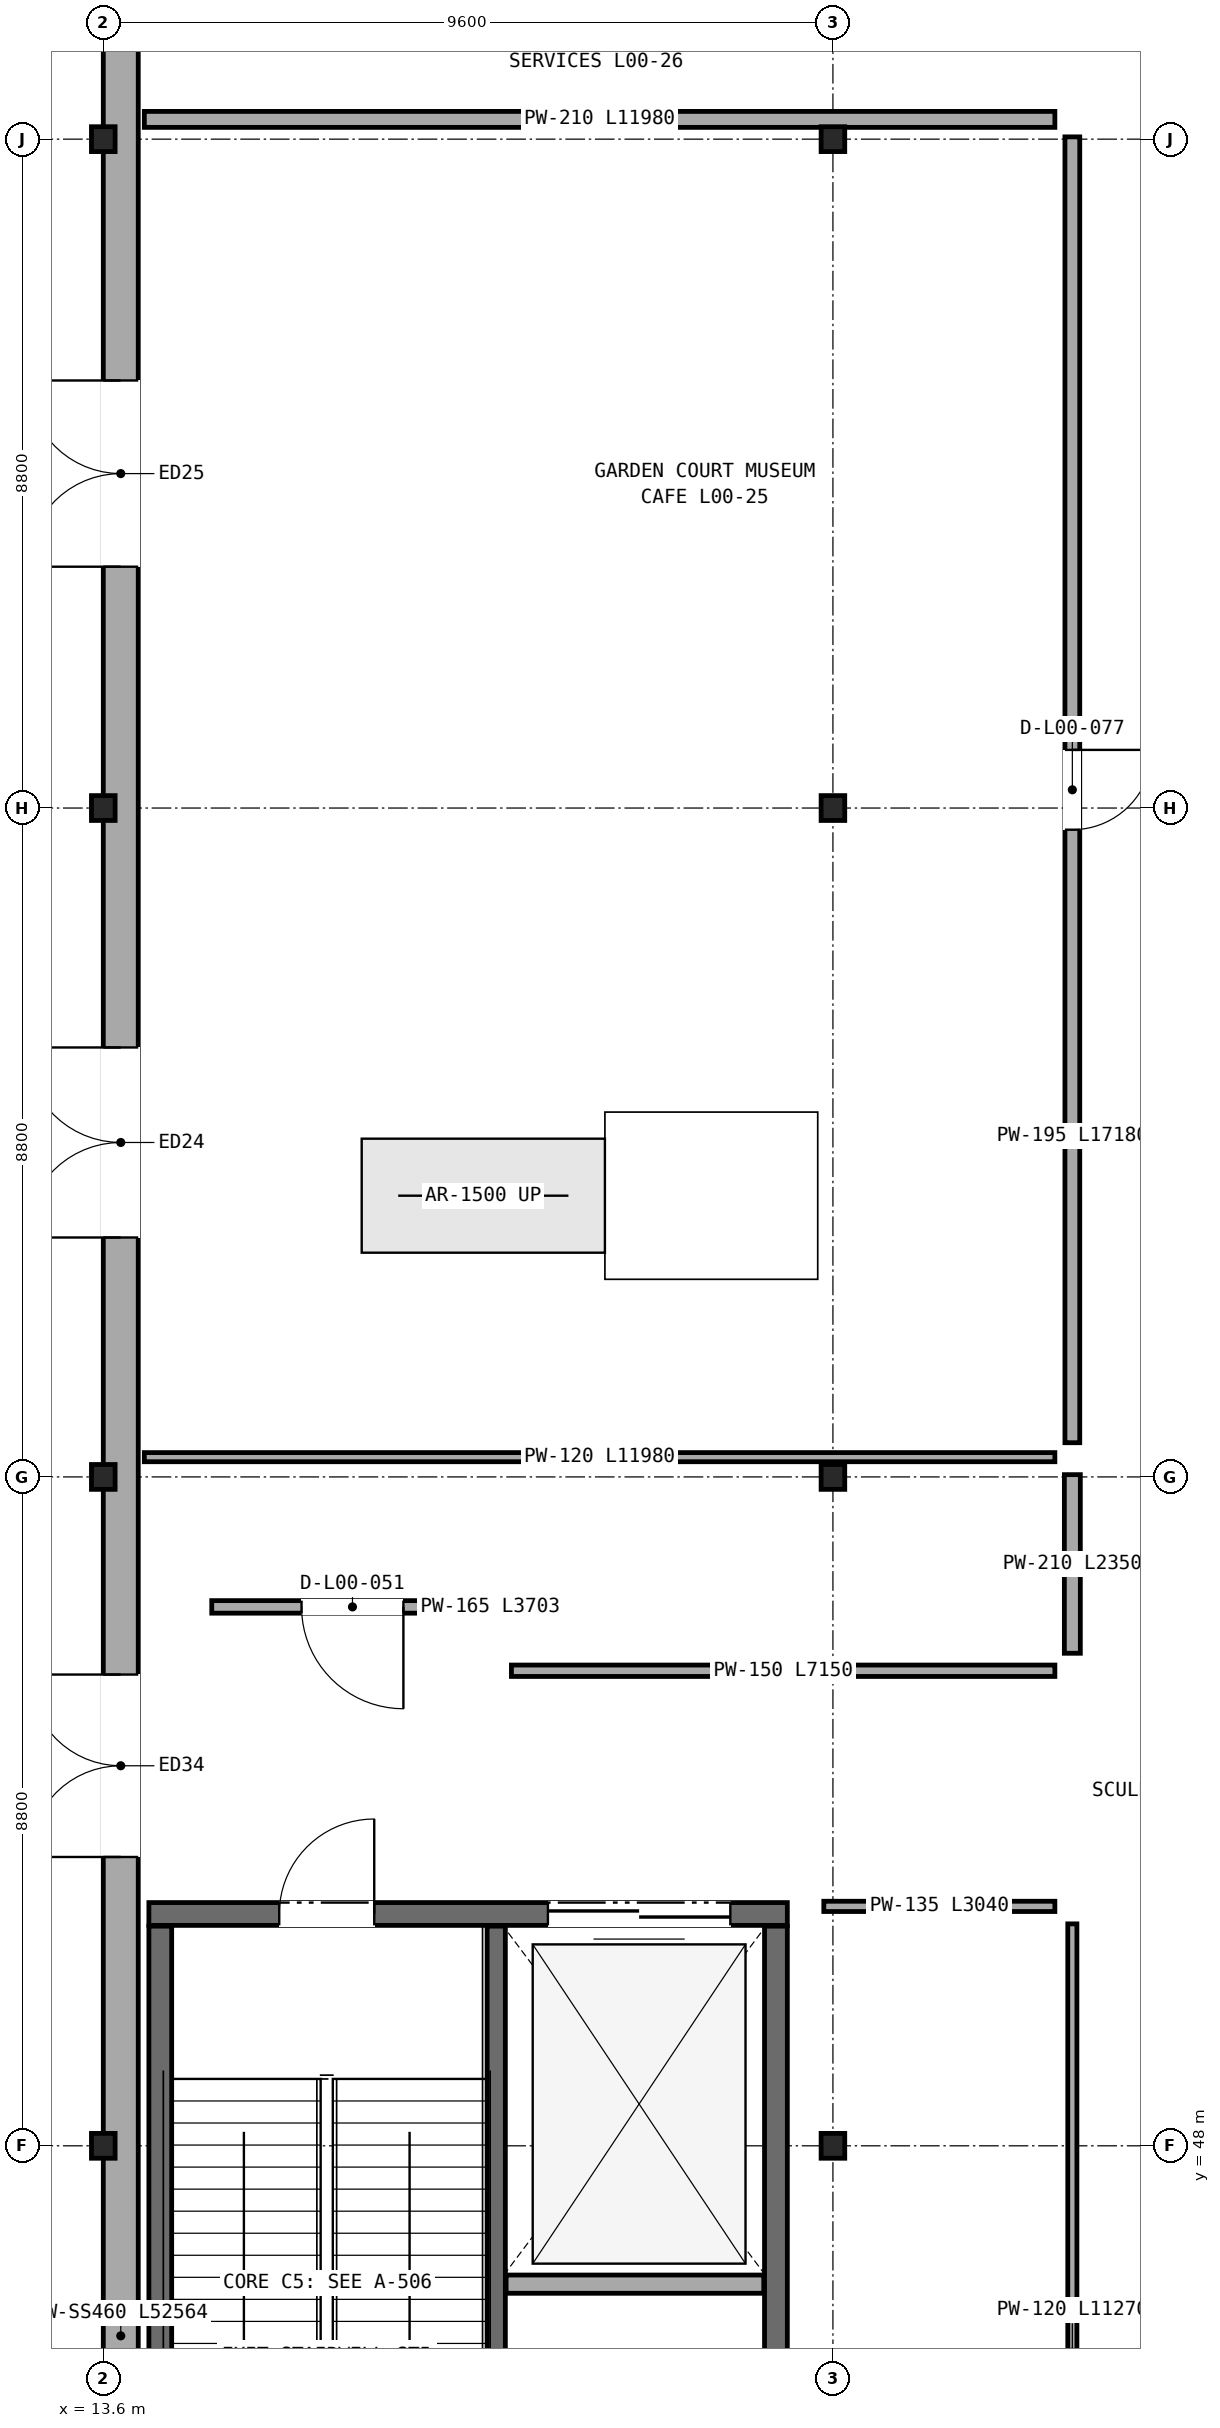
"""IFC4 building model, lengths in metres.
Left out: names, types, materials, properties, quantities, classifications, styles, units other than length and angle.
Written with IfcOpenShell. Run it as: python <this file> out.ifc"""

import sys

from ifc_helpers import new_model, si_unit, direction, frame, frame_2d, origin, origin_2d, place, context, subcontext, project, spatial, rectangle, i_section, extrude, element, fill, save


model = new_model("IFC4")
c1 = context("Model", 3, precision=1e-05, world=origin(), true_north=direction((0.0, 1.0)))
c2 = subcontext(c1, "Body", "Model", "MODEL_VIEW")
j1 = project(units=[si_unit("LENGTHUNIT", "METRE"), si_unit("PLANEANGLEUNIT", "RADIAN")], contexts=[c1])
p1 = place(None, origin())
s1 = spatial("IfcSite", under=j1, at=p1, CompositionType="ELEMENT")
p2 = place(p1, origin())
s2 = spatial("IfcBuilding", under=s1, at=p2, CompositionType="ELEMENT")
p3 = place(p2, origin())
s3 = spatial("IfcBuildingStorey", under=s2, at=p3, CompositionType="ELEMENT", Elevation=0.0)
for number, where, z_axis, x_axis in (
    (1, (13.6, 48.0, 0.0), (0.0, 0.0, 1.0), (1.0, 0.0, 0.0)),
    (2, (13.6, 56.8, 0.0), (0.0, 0.0, 1.0), (1.0, 0.0, 0.0)),
    (3, (13.6, 65.6, 0.0), (0.0, 0.0, 1.0), (1.0, 0.0, 0.0)),
    (4, (13.6, 74.4, 0.0), (0.0, 0.0, 1.0), (1.0, 0.0, 0.0)),
    (5, (23.2, 48.0, 0.0), (0.0, 0.0, 1.0), (1.0, 0.0, 0.0)),
    (6, (23.2, 56.8, 0.0), (0.0, 0.0, 1.0), (1.0, 0.0, 0.0)),
    (7, (23.2, 65.6, 0.0), (0.0, 0.0, 1.0), (1.0, 0.0, 0.0)),
    (8, (23.2, 74.4, 0.0), (0.0, 0.0, 1.0), (1.0, 0.0, 0.0)),
):
    element("IfcColumn", number, at=place(p3, frame(where, z_axis=z_axis, x_axis=x_axis)), inside=s3, PredefinedType="COLUMN", context=c2, shape_type="SweptSolid", body=[
        extrude(i_section(OverallWidth=0.311, OverallDepth=0.327, WebThickness=0.016, FlangeThickness=0.025, FilletRadius=0.017, at=origin_2d()), origin(), (0.0, 0.0, 1.0), 5.6),
    ])
p4 = place(p3, frame((13.83, 91.764, 0.0), z_axis=(0.0, 0.0, 1.0), x_axis=(0.0, -1.0, 0.0)))
e9 = element("IfcWall", 9, at=p4, inside=s3, PredefinedType="SOLIDWALL", context=c2, shape_type="SweptSolid", body=[
    extrude(rectangle(XDim=52.564, YDim=0.46, at=frame_2d((26.282, 0.0))), origin(), (0.0, 0.0, 1.0), 4.653),
])
p5 = place(p4, frame((29.314, 0.0, 0.0)))
e10 = element("IfcOpeningElement", 10, at=p5, cuts=e9, PredefinedType="OPENING", context=c2, shape_type="SweptSolid", body=[
    extrude(rectangle(XDim=2.5, YDim=2.55, at=frame_2d((1.25, 1.275))), frame((0.0, 0.24, 0.0), z_axis=(0.0, -1.0, 0.0), x_axis=(1.0, 0.0, 0.0)), (0.0, 0.0, 1.0), 0.48),
])
p6 = place(p4, frame((20.539, 0.0, 0.0)))
e11 = element("IfcOpeningElement", 11, at=p6, cuts=e9, PredefinedType="OPENING", context=c2, shape_type="SweptSolid", body=[
    extrude(rectangle(XDim=2.45, YDim=2.5, at=frame_2d((1.225, 1.25))), frame((0.0, 0.24, 0.0), z_axis=(0.0, -1.0, 0.0), x_axis=(1.0, 0.0, 0.0)), (0.0, 0.0, 1.0), 0.48),
])
p7 = place(p4, frame((11.764, 0.0, 0.0)))
e12 = element("IfcOpeningElement", 12, at=p7, cuts=e9, PredefinedType="OPENING", context=c2, shape_type="SweptSolid", body=[
    extrude(rectangle(XDim=2.4, YDim=2.45, at=frame_2d((1.2, 1.225))), frame((0.0, 0.24, 0.0), z_axis=(0.0, -1.0, 0.0), x_axis=(1.0, 0.0, 0.0)), (0.0, 0.0, 1.0), 0.48),
])
p8 = place(p4, frame((3.014, 0.0, 0.0)))
e13 = element("IfcOpeningElement", 13, at=p8, cuts=e9, PredefinedType="OPENING", context=c2, shape_type="SweptSolid", body=[
    extrude(rectangle(XDim=2.3, YDim=2.4, at=frame_2d((1.15, 1.2))), frame((0.0, 0.24, 0.0), z_axis=(0.0, -1.0, 0.0), x_axis=(1.0, 0.0, 0.0)), (0.0, 0.0, 1.0), 0.48),
])
p9 = place(p4, frame((37.564, 0.0, 0.0)))
e14 = element("IfcOpeningElement", 14, at=p9, cuts=e9, PredefinedType="OPENING", context=c2, shape_type="SweptSolid", body=[
    extrude(rectangle(XDim=2.4, YDim=2.45, at=frame_2d((1.2, 1.225))), frame((0.0, 0.24, 0.0), z_axis=(0.0, -1.0, 0.0), x_axis=(1.0, 0.0, 0.0)), (0.0, 0.0, 1.0), 0.48),
])
p10 = place(p4, frame((6.4, 0.0, 0.9)))
e15 = element("IfcOpeningElement", 15, at=p10, cuts=e9, PredefinedType="OPENING", context=c2, shape_type="SweptSolid", body=[
    extrude(rectangle(XDim=1.4, YDim=1.85, at=frame_2d((0.7, 0.925))), frame((0.0, 0.24, 0.0), z_axis=(0.0, -1.0, 0.0), x_axis=(1.0, 0.0, 0.0)), (0.0, 0.0, 1.0), 0.48),
])
p11 = place(p3, frame((22.6, 51.05, 0.0), z_axis=(0.0, 0.0, 1.0), x_axis=(-1.0, 0.0, 0.0)))
e16 = element("IfcWall", 16, at=p11, inside=s3, PredefinedType="SHEAR", context=c2, shape_type="SweptSolid", body=[
    extrude(rectangle(XDim=8.4, YDim=0.3, at=frame_2d((4.2, 0.0))), origin(), (0.0, 0.0, 1.0), 5.345),
])
p12 = place(p11, frame((5.435, 0.0, 0.0)))
e17 = element("IfcOpeningElement", 17, at=p12, cuts=e16, PredefinedType="OPENING", context=c2, shape_type="SweptSolid", body=[
    extrude(rectangle(XDim=1.25, YDim=2.2, at=frame_2d((0.625, 1.1))), frame((0.0, 0.16, 0.0), z_axis=(0.0, -1.0, 0.0), x_axis=(1.0, 0.0, 0.0)), (0.0, 0.0, 1.0), 0.32),
])
p13 = place(p11, frame((0.75, 0.0, 0.0)))
e18 = element("IfcOpeningElement", 18, at=p13, cuts=e16, PredefinedType="OPENING", context=c2, shape_type="SweptSolid", body=[
    extrude(rectangle(XDim=2.4, YDim=2.55, at=frame_2d((1.2, 1.275))), frame((0.0, 0.16, 0.0), z_axis=(0.0, -1.0, 0.0), x_axis=(1.0, 0.0, 0.0)), (0.0, 0.0, 1.0), 0.32),
])
for number, where, z_axis, x_axis in (
    (19, (22.45, 41.51, 0.0), (0.0, 0.0, 1.0), (0.0, 1.0, 0.0)),
    (20, (14.35, 50.89, 0.0), (0.0, 0.0, 1.0), (0.0, -1.0, 0.0)),
):
    element("IfcWall", number, at=place(p3, frame(where, z_axis=z_axis, x_axis=x_axis)), inside=s3, PredefinedType="SHEAR", context=c2, shape_type="SweptSolid", body=[
        extrude(rectangle(XDim=9.38, YDim=0.3, at=frame_2d((4.69, 0.0))), origin(), (0.0, 0.0, 1.0), 5.345),
    ])
p14 = place(p3, frame((18.77, 41.51, 0.0), z_axis=(0.0, 0.0, 1.0), x_axis=(0.0, 1.0, 0.0)))
e21 = element("IfcWall", 21, at=p14, inside=s3, PredefinedType="SOLIDWALL", context=c2, shape_type="SweptSolid", body=[
    extrude(rectangle(XDim=9.38, YDim=0.24, at=frame_2d((4.69, 0.0))), origin(), (0.0, 0.0, 1.0), 5.345),
])
p15 = place(p3, frame((18.9, 46.18, 0.0), z_axis=(0.0, 0.0, 1.0), x_axis=(1.0, 0.0, 0.0)))
e22 = element("IfcWall", 22, at=p15, inside=s3, PredefinedType="SOLIDWALL", context=c2, shape_type="SweptSolid", body=[
    extrude(rectangle(XDim=3.39, YDim=0.24, at=frame_2d((1.695, 0.0))), origin(), (0.0, 0.0, 1.0), 5.345),
])
p16 = place(p3, frame((18.73, 55.09, 0.0), z_axis=(0.0, 0.0, 1.0), x_axis=(-1.0, 0.0, 0.0)))
e23 = element("IfcWall", 23, at=p16, inside=s3, PredefinedType="PARTITIONING", context=c2, shape_type="SweptSolid", body=[
    extrude(rectangle(XDim=3.703, YDim=0.165, at=frame_2d((1.852, 0.0))), origin(), (0.0, 0.0, 1.0), 5.23),
])
p17 = place(p16, frame((1.181, 0.0, 0.0)))
e24 = element("IfcOpeningElement", 24, at=p17, cuts=e23, PredefinedType="OPENING", context=c2, shape_type="SweptSolid", body=[
    extrude(rectangle(XDim=1.34, YDim=2.16, at=frame_2d((0.67, 1.08))), frame((0.0, 0.093, 0.0), z_axis=(0.0, -1.0, 0.0), x_axis=(1.0, 0.0, 0.0)), (0.0, 0.0, 1.0), 0.185),
])
p18 = place(p3, frame((26.12, 54.25, 0.0), z_axis=(0.0, 0.0, 1.0), x_axis=(-1.0, 0.0, 0.0)))
e25 = element("IfcWall", 25, at=p18, inside=s3, PredefinedType="PARTITIONING", context=c2, shape_type="SweptSolid", body=[
    extrude(rectangle(XDim=7.15, YDim=0.15, at=frame_2d((3.575, 0.0))), origin(), (0.0, 0.0, 1.0), 4.787),
])
p19 = place(p3, frame((23.08, 51.15, 0.0), z_axis=(0.0, 0.0, 1.0), x_axis=(1.0, 0.0, 0.0)))
e26 = element("IfcWall", 26, at=p19, inside=s3, PredefinedType="PARTITIONING", context=c2, shape_type="SweptSolid", body=[
    extrude(rectangle(XDim=3.04, YDim=0.135, at=frame_2d((1.52, 0.0))), origin(), (0.0, 0.0, 1.0), 4.787),
])
p20 = place(p3, frame((26.35, 50.92, 0.0), z_axis=(0.0, 0.0, 1.0), x_axis=(0.0, -1.0, 0.0)))
e27 = element("IfcWall", 27, at=p20, inside=s3, PredefinedType="PARTITIONING", context=c2, shape_type="SweptSolid", body=[
    extrude(rectangle(XDim=11.27, YDim=0.12, at=frame_2d((5.635, 0.0))), origin(), (0.0, 0.0, 1.0), 4.708),
])
p21 = place(p3, frame((26.35, 56.83, 0.0), z_axis=(0.0, 0.0, 1.0), x_axis=(0.0, -1.0, 0.0)))
e28 = element("IfcWall", 28, at=p21, inside=s3, PredefinedType="PARTITIONING", context=c2, shape_type="SweptSolid", body=[
    extrude(rectangle(XDim=2.35, YDim=0.21, at=frame_2d((1.175, 0.0))), origin(), (0.0, 0.0, 1.0), 4.708),
])
p22 = place(p3, frame((26.35, 74.43, 0.0), z_axis=(0.0, 0.0, 1.0), x_axis=(0.0, -1.0, 0.0)))
e29 = element("IfcWall", 29, at=p22, inside=s3, PredefinedType="PARTITIONING", context=c2, shape_type="SweptSolid", body=[
    extrude(rectangle(XDim=17.18, YDim=0.195, at=frame_2d((8.59, 0.0))), origin(), (0.0, 0.0, 1.0), 4.708),
])
p23 = place(p22, frame((8.065, 0.0, 0.0)))
e30 = element("IfcOpeningElement", 30, at=p23, cuts=e29, PredefinedType="OPENING", context=c2, shape_type="SweptSolid", body=[
    extrude(rectangle(XDim=1.05, YDim=2.15, at=frame_2d((0.525, 1.075))), frame((0.0, 0.107, 0.0), z_axis=(0.0, -1.0, 0.0), x_axis=(1.0, 0.0, 0.0)), (0.0, 0.0, 1.0), 0.215),
])
p24 = place(p3, frame((14.14, 57.06, 0.0), z_axis=(0.0, 0.0, 1.0), x_axis=(1.0, 0.0, 0.0)))
e31 = element("IfcWall", 31, at=p24, inside=s3, PredefinedType="PARTITIONING", context=c2, shape_type="SweptSolid", body=[
    extrude(rectangle(XDim=11.98, YDim=0.12, at=frame_2d((5.99, 0.0))), origin(), (0.0, 0.0, 1.0), 4.708),
])
p25 = place(p3, frame((14.14, 74.66, 0.0), z_axis=(0.0, 0.0, 1.0), x_axis=(1.0, 0.0, 0.0)))
e32 = element("IfcWall", 32, at=p25, inside=s3, PredefinedType="PARTITIONING", context=c2, shape_type="SweptSolid", body=[
    extrude(rectangle(XDim=11.98, YDim=0.21, at=frame_2d((5.99, 0.0))), origin(), (0.0, 0.0, 1.0), 4.708),
])
p26 = place(p5, frame((2.5, 0.0, 0.0), z_axis=(0.0, 0.0, 1.0), x_axis=(-1.0, 0.0, 0.0)))
e33 = element("IfcDoor", 33, at=p26, inside=s3, OperationType="DOUBLE_DOOR_SINGLE_SWING", PredefinedType="DOOR", context=c2, shape_type="SweptSolid", body=[
    extrude(rectangle(XDim=2.5, YDim=2.55, at=frame_2d((1.25, 1.275))), frame((0.0, 0.025, 0.0), z_axis=(0.0, -1.0, 0.0), x_axis=(1.0, 0.0, 0.0)), (0.0, 0.0, 1.0), 0.05),
])
fill(e10, e33)
p27 = place(p6, frame((2.45, 0.0, 0.0), z_axis=(0.0, 0.0, 1.0), x_axis=(-1.0, 0.0, 0.0)))
e34 = element("IfcDoor", 34, at=p27, inside=s3, OperationType="DOUBLE_DOOR_SINGLE_SWING", PredefinedType="DOOR", context=c2, shape_type="SweptSolid", body=[
    extrude(rectangle(XDim=2.45, YDim=2.5, at=frame_2d((1.225, 1.25))), frame((0.0, 0.025, 0.0), z_axis=(0.0, -1.0, 0.0), x_axis=(1.0, 0.0, 0.0)), (0.0, 0.0, 1.0), 0.05),
])
fill(e11, e34)
p28 = place(p9, frame((2.4, 0.0, 0.0), z_axis=(0.0, 0.0, 1.0), x_axis=(-1.0, 0.0, 0.0)))
e35 = element("IfcDoor", 35, at=p28, inside=s3, OperationType="DOUBLE_DOOR_SINGLE_SWING", PredefinedType="DOOR", context=c2, shape_type="SweptSolid", body=[
    extrude(rectangle(XDim=2.4, YDim=2.45, at=frame_2d((1.2, 1.225))), frame((0.0, 0.025, 0.0), z_axis=(0.0, -1.0, 0.0), x_axis=(1.0, 0.0, 0.0)), (0.0, 0.0, 1.0), 0.05),
])
fill(e14, e35)
p29 = place(p12, frame((1.25, 0.0, 0.0), z_axis=(0.0, 0.0, 1.0), x_axis=(-1.0, 0.0, 0.0)))
e36 = element("IfcDoor", 36, at=p29, inside=s3, OperationType="SINGLE_SWING_LEFT", PredefinedType="DOOR", context=c2, shape_type="SweptSolid", body=[
    extrude(rectangle(XDim=1.25, YDim=2.2, at=frame_2d((0.625, 1.1))), frame((0.0, 0.025, 0.0), z_axis=(0.0, -1.0, 0.0), x_axis=(1.0, 0.0, 0.0)), (0.0, 0.0, 1.0), 0.05),
])
fill(e17, e36)
p30 = place(p13, origin())
e37 = element("IfcDoor", 37, at=p30, inside=s3, OperationType="DOUBLE_DOOR_SLIDING", PredefinedType="DOOR", context=c2, shape_type="SweptSolid", body=[
    extrude(rectangle(XDim=2.4, YDim=2.55, at=frame_2d((1.2, 1.275))), frame((0.0, 0.025, 0.0), z_axis=(0.0, -1.0, 0.0), x_axis=(1.0, 0.0, 0.0)), (0.0, 0.0, 1.0), 0.05),
])
fill(e18, e37)
p31 = place(p17, origin())
e38 = element("IfcDoor", 38, at=p31, inside=s3, OperationType="SINGLE_SWING_LEFT", PredefinedType="DOOR", context=c2, shape_type="SweptSolid", body=[
    extrude(rectangle(XDim=1.34, YDim=2.16, at=frame_2d((0.67, 1.08))), frame((0.0, 0.025, 0.0), z_axis=(0.0, -1.0, 0.0), x_axis=(1.0, 0.0, 0.0)), (0.0, 0.0, 1.0), 0.05),
])
fill(e24, e38)
p32 = place(p23, origin())
e39 = element("IfcDoor", 39, at=p32, inside=s3, OperationType="SINGLE_SWING_LEFT", PredefinedType="DOOR", context=c2, shape_type="SweptSolid", body=[
    extrude(rectangle(XDim=1.05, YDim=2.15, at=frame_2d((0.525, 1.075))), frame((0.0, 0.025, 0.0), z_axis=(0.0, -1.0, 0.0), x_axis=(1.0, 0.0, 0.0)), (0.0, 0.0, 1.0), 0.05),
])
fill(e30, e39)
save(model, sys.argv[1])
